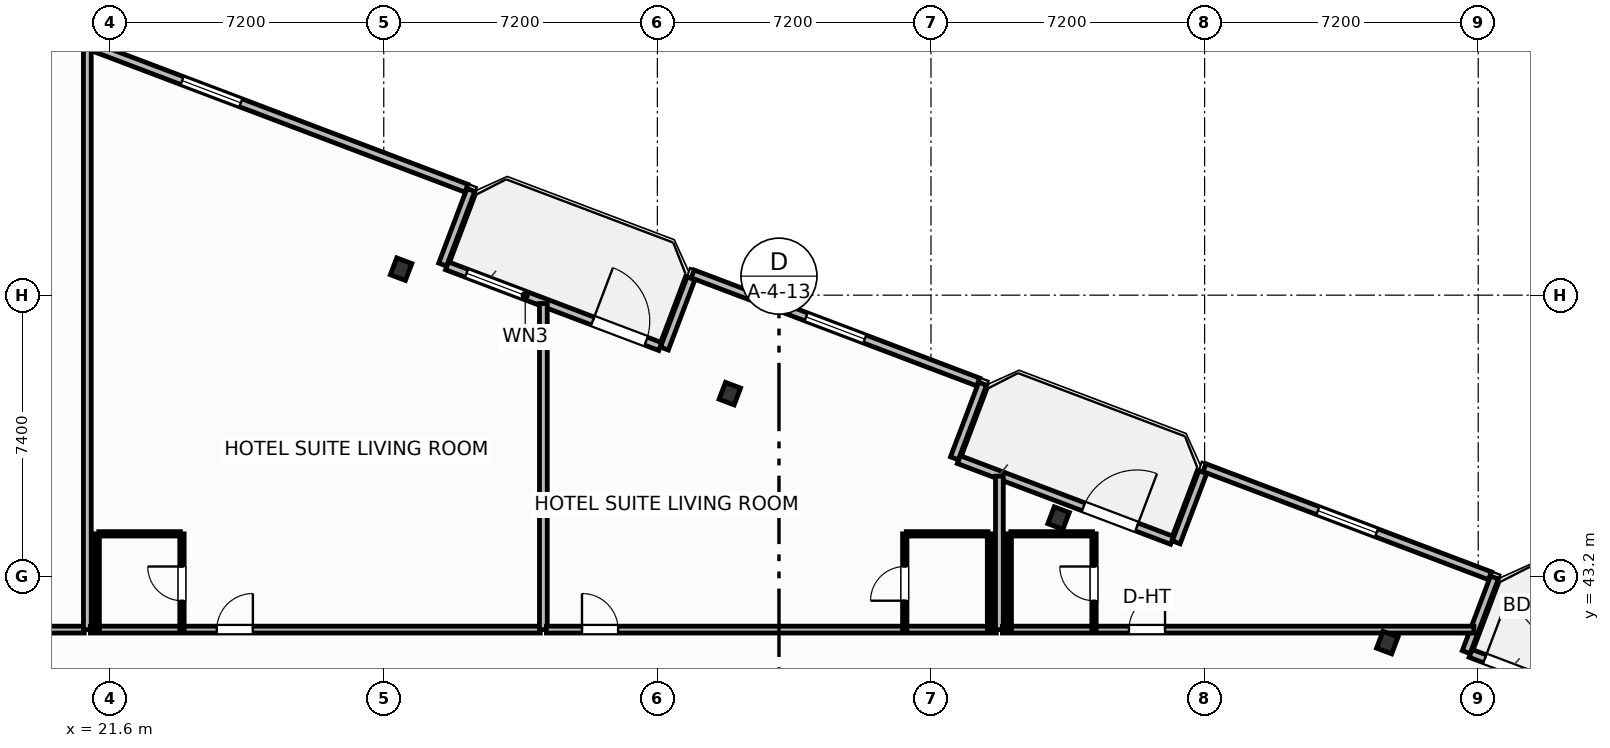
"""IFC4 building model, lengths in metres.
Left out: names, types, materials, properties, quantities, classifications, styles, units other than length and angle.
Written with IfcOpenShell. Run it as: python <this file> out.ifc"""

import sys

from ifc_helpers import new_model, si_unit, direction, frame, frame_2d, origin, origin_2d, place, context, subcontext, project, spatial, rectangle, i_section, extrude, element, fill, save


model = new_model("IFC4")
c1 = context("Model", 3, precision=1e-05, world=origin(), true_north=direction((0.0, 1.0)))
c2 = subcontext(c1, "Body", "Model", "MODEL_VIEW")
j1 = project(units=[si_unit("LENGTHUNIT", "METRE"), si_unit("PLANEANGLEUNIT", "RADIAN")], contexts=[c1])
p1 = place(None, origin())
s1 = spatial("IfcSite", under=j1, at=p1, CompositionType="ELEMENT")
p2 = place(p1, origin())
s2 = spatial("IfcBuilding", under=s1, at=p2, CompositionType="ELEMENT")
p3 = place(p2, frame((0.0, 0.0, 109.5)))
s3 = spatial("IfcBuildingStorey", under=s2, at=p3, CompositionType="ELEMENT", Elevation=109.5)
for number, where, z_axis, x_axis in (
    (1, (55.208, 41.459, 0.0), (0.0, 0.0, 1.0), (0.935, -0.354, 0.0)),
    (2, (46.557, 44.734, 0.0), (0.0, 0.0, 1.0), (0.935, -0.354, 0.0)),
    (3, (37.906, 48.009, 0.0), (0.0, 0.0, 1.0), (0.935, -0.354, 0.0)),
    (4, (29.256, 51.284, 0.0), (0.0, 0.0, 1.0), (0.935, -0.354, 0.0)),
):
    element("IfcColumn", number, at=place(p3, frame(where, z_axis=z_axis, x_axis=x_axis)), inside=s3, PredefinedType="COLUMN", context=c2, shape_type="SweptSolid", body=[
        extrude(i_section(OverallWidth=0.424, OverallDepth=0.474, WebThickness=0.048, FlangeThickness=0.077, FilletRadius=0.025, at=origin_2d()), origin(), (0.0, 0.0, 1.0), 3.7),
    ])
p4 = place(p3, frame((30.465, 51.372, 0.0), z_axis=(0.0, 0.0, 1.0), x_axis=(0.935227640088, -0.354046976001, 0.0)))
e5 = element("IfcWall", 5, at=p4, inside=s3, PredefinedType="SOLIDWALL", context=c2, shape_type="SweptSolid", body=[
    extrude(rectangle(XDim=6.0, YDim=0.22, at=frame_2d((3.0, 0.0))), origin(), (0.0, 0.0, 1.0), 2.73),
])
p5 = place(p4, frame((4.1, 0.0, 0.0)))
e6 = element("IfcOpeningElement", 6, at=p5, cuts=e5, PredefinedType="OPENING", context=c2, shape_type="SweptSolid", body=[
    extrude(rectangle(XDim=1.5, YDim=2.25, at=frame_2d((0.75, 1.125))), frame((0.0, 0.12, 0.0), z_axis=(0.0, -1.0, 0.0), x_axis=(1.0, 0.0, 0.0)), (0.0, 0.0, 1.0), 0.24),
])
p6 = place(p4, frame((0.55, 0.0, 0.75)))
e7 = element("IfcOpeningElement", 7, at=p6, cuts=e5, PredefinedType="OPENING", context=c2, shape_type="SweptSolid", body=[
    extrude(rectangle(XDim=1.65, YDim=1.65, at=frame_2d((0.825, 0.825))), frame((0.0, 0.12, 0.0), z_axis=(0.0, -1.0, 0.0), x_axis=(1.0, 0.0, 0.0)), (0.0, 0.0, 1.0), 0.24),
])
p7 = place(p3, frame((43.932, 46.273, 0.0), z_axis=(0.0, 0.0, 1.0), x_axis=(0.93521416643, -0.354082565101, 0.0)))
e8 = element("IfcWall", 8, at=p7, inside=s3, PredefinedType="SOLIDWALL", context=c2, shape_type="SweptSolid", body=[
    extrude(rectangle(XDim=6.0, YDim=0.22, at=frame_2d((3.0, 0.0))), origin(), (0.0, 0.0, 1.0), 2.73),
])
p8 = place(p7, frame((3.508, 0.0, 0.0)))
e9 = element("IfcOpeningElement", 9, at=p8, cuts=e8, PredefinedType="OPENING", context=c2, shape_type="SweptSolid", body=[
    extrude(rectangle(XDim=1.5, YDim=2.25, at=frame_2d((0.75, 1.125))), frame((0.0, 0.12, 0.0), z_axis=(0.0, -1.0, 0.0), x_axis=(1.0, 0.0, 0.0)), (0.0, 0.0, 1.0), 0.24),
])
p9 = place(p3, frame((57.399, 41.175, 0.0), z_axis=(0.0, 0.0, 1.0), x_axis=(0.935227640088, -0.354046976001, 0.0)))
e10 = element("IfcWall", 10, at=p9, inside=s3, PredefinedType="SOLIDWALL", context=c2, shape_type="SweptSolid", body=[
    extrude(rectangle(XDim=6.0, YDim=0.22, at=frame_2d((3.0, 0.0))), origin(), (0.0, 0.0, 1.0), 2.73),
])
p10 = place(p9, frame((0.4, 0.0, 0.0)))
e11 = element("IfcOpeningElement", 11, at=p10, cuts=e10, PredefinedType="OPENING", context=c2, shape_type="SweptSolid", body=[
    extrude(rectangle(XDim=1.5, YDim=2.25, at=frame_2d((0.75, 1.125))), frame((0.0, 0.12, 0.0), z_axis=(0.0, -1.0, 0.0), x_axis=(1.0, 0.0, 0.0)), (0.0, 0.0, 1.0), 0.24),
])
p11 = place(p3, frame((57.284, 41.208, 0.0), z_axis=(0.0, 0.0, 1.0), x_axis=(0.354128469405, 0.935196785258, 0.0)))
e12 = element("IfcWall", 12, at=p11, inside=s3, PredefinedType="SOLIDWALL", context=c2, shape_type="SweptSolid", body=[
    extrude(rectangle(XDim=2.1, YDim=0.22, at=frame_2d((1.05, 0.0))), origin(), (0.0, 0.0, 1.0), 2.73),
])
p12 = place(p3, frame((57.91, 43.216, 0.0), z_axis=(0.0, 0.0, 1.0), x_axis=(-0.935220736163, 0.354065212427, 0.0)))
e13 = element("IfcWall", 13, at=p12, inside=s3, PredefinedType="SOLIDWALL", context=c2, shape_type="SweptSolid", body=[
    extrude(rectangle(XDim=8.035, YDim=0.22, at=frame_2d((4.018, 0.0))), origin(), (0.0, 0.0, 1.0), 2.73),
])
p13 = place(p12, frame((3.192, 0.0, 0.8)))
e14 = element("IfcOpeningElement", 14, at=p13, cuts=e13, PredefinedType="OPENING", context=c2, shape_type="SweptSolid", body=[
    extrude(rectangle(XDim=1.65, YDim=1.65, at=frame_2d((0.825, 0.825))), frame((0.0, 0.12, 0.0), z_axis=(0.0, -1.0, 0.0), x_axis=(1.0, 0.0, 0.0)), (0.0, 0.0, 1.0), 0.24),
])
p14 = place(p3, frame((50.352, 45.944, 0.0), z_axis=(0.0, 0.0, 1.0), x_axis=(-0.354061611705, -0.935222099352, 0.0)))
e15 = element("IfcWall", 15, at=p14, inside=s3, PredefinedType="SOLIDWALL", context=c2, shape_type="SweptSolid", body=[
    extrude(rectangle(XDim=1.975, YDim=0.22, at=frame_2d((0.987, 0.0))), origin(), (0.0, 0.0, 1.0), 2.73),
])
p15 = place(p3, frame((43.817, 46.306, 0.0), z_axis=(0.0, 0.0, 1.0), x_axis=(0.353988291547, 0.935249854022, 0.0)))
e16 = element("IfcWall", 16, at=p15, inside=s3, PredefinedType="SOLIDWALL", context=c2, shape_type="SweptSolid", body=[
    extrude(rectangle(XDim=2.1, YDim=0.22, at=frame_2d((1.05, 0.0))), origin(), (0.0, 0.0, 1.0), 2.73),
])
p16 = place(p3, frame((44.443, 48.314, 0.0), z_axis=(0.0, 0.0, 1.0), x_axis=(-0.935226988293, 0.354048697735, 0.0)))
e17 = element("IfcWall", 17, at=p16, inside=s3, PredefinedType="SOLIDWALL", context=c2, shape_type="SweptSolid", body=[
    extrude(rectangle(XDim=8.035, YDim=0.22, at=frame_2d((4.018, 0.0))), origin(), (0.0, 0.0, 1.0), 2.73),
])
p17 = place(p16, frame((3.192, 0.0, 0.8)))
e18 = element("IfcOpeningElement", 18, at=p17, cuts=e17, PredefinedType="OPENING", context=c2, shape_type="SweptSolid", body=[
    extrude(rectangle(XDim=1.65, YDim=1.65, at=frame_2d((0.825, 0.825))), frame((0.0, 0.12, 0.0), z_axis=(0.0, -1.0, 0.0), x_axis=(1.0, 0.0, 0.0)), (0.0, 0.0, 1.0), 0.24),
])
p18 = place(p3, frame((36.885, 51.042, 0.0), z_axis=(0.0, 0.0, 1.0), x_axis=(-0.354128791944, -0.935196663123, 0.0)))
e19 = element("IfcWall", 19, at=p18, inside=s3, PredefinedType="SOLIDWALL", context=c2, shape_type="SweptSolid", body=[
    extrude(rectangle(XDim=1.975, YDim=0.22, at=frame_2d((0.988, 0.0))), origin(), (0.0, 0.0, 1.0), 2.73),
])
p19 = place(p3, frame((30.349, 51.405, 0.0), z_axis=(0.0, 0.0, 1.0), x_axis=(0.354128469405, 0.935196785258, 0.0)))
e20 = element("IfcWall", 20, at=p19, inside=s3, PredefinedType="SOLIDWALL", context=c2, shape_type="SweptSolid", body=[
    extrude(rectangle(XDim=2.1, YDim=0.22, at=frame_2d((1.05, 0.0))), origin(), (0.0, 0.0, 1.0), 2.73),
])
p20 = place(p3, frame((30.976, 53.413, 0.0), z_axis=(0.0, 0.0, 1.0), x_axis=(-0.935220327379, 0.354066292178, 0.0)))
e21 = element("IfcWall", 21, at=p20, inside=s3, PredefinedType="SOLIDWALL", context=c2, shape_type="SweptSolid", body=[
    extrude(rectangle(XDim=14.347, YDim=0.22, at=frame_2d((7.174, 0.0))), origin(), (0.0, 0.0, 1.0), 2.73),
])
p21 = place(p20, frame((6.348, 0.0, 0.8)))
e22 = element("IfcOpeningElement", 22, at=p21, cuts=e21, PredefinedType="OPENING", context=c2, shape_type="SweptSolid", body=[
    extrude(rectangle(XDim=1.65, YDim=1.65, at=frame_2d((0.825, 0.825))), frame((0.0, 0.12, 0.0), z_axis=(0.0, -1.0, 0.0), x_axis=(1.0, 0.0, 0.0)), (0.0, 0.0, 1.0), 0.24),
])
p22 = place(p3, frame((5.646, 41.8, 0.0), z_axis=(0.0, 0.0, 1.0), x_axis=(1.0, 0.0, 0.0)))
e23 = element("IfcWall", 23, at=p22, inside=s3, PredefinedType="PARTITIONING", context=c2, shape_type="SweptSolid", body=[
    extrude(rectangle(XDim=15.274, YDim=0.18, at=frame_2d((7.637, 0.0))), origin(), (0.0, 0.0, 1.0), 3.45),
])
p23 = place(p22, frame((13.329, 0.0, 0.0)))
e24 = element("IfcOpeningElement", 24, at=p23, cuts=e23, PredefinedType="OPENING", context=c2, shape_type="SweptSolid", body=[
    extrude(rectangle(XDim=0.95, YDim=2.05, at=frame_2d((0.475, 1.025))), frame((0.0, 0.1, 0.0), z_axis=(0.0, -1.0, 0.0), x_axis=(1.0, 0.0, 0.0)), (0.0, 0.0, 1.0), 0.2),
])
p24 = place(p3, frame((21.0, 41.8, 0.0), z_axis=(0.0, 0.0, 1.0), x_axis=(0.0, 1.0, 0.0)))
e25 = element("IfcWall", 25, at=p24, inside=s3, PredefinedType="PARTITIONING", context=c2, shape_type="SweptSolid", body=[
    extrude(rectangle(XDim=15.285, YDim=0.205, at=frame_2d((7.642, 0.0))), origin(), (0.0, 0.0, 1.0), 3.45),
])
p25 = place(p3, frame((21.08, 41.8, 0.0), z_axis=(0.0, 0.0, 1.0), x_axis=(1.0, 0.0, 0.0)))
e26 = element("IfcWall", 26, at=p25, inside=s3, PredefinedType="PARTITIONING", context=c2, shape_type="SweptSolid", body=[
    extrude(rectangle(XDim=11.84, YDim=0.18, at=frame_2d((5.92, 0.0))), origin(), (0.0, 0.0, 1.0), 3.45),
])
p26 = place(p25, frame((3.326, 0.0, 0.0)))
e27 = element("IfcOpeningElement", 27, at=p26, cuts=e26, PredefinedType="OPENING", context=c2, shape_type="SweptSolid", body=[
    extrude(rectangle(XDim=0.95, YDim=2.15, at=frame_2d((0.475, 1.075))), frame((0.0, 0.1, 0.0), z_axis=(0.0, -1.0, 0.0), x_axis=(1.0, 0.0, 0.0)), (0.0, 0.0, 1.0), 0.2),
])
p27 = place(p3, frame((21.3, 44.32, 0.0), z_axis=(0.0, 0.0, 1.0), x_axis=(1.0, 0.0, 0.0)))
e28 = element("IfcWall", 28, at=p27, inside=s3, PredefinedType="PARTITIONING", context=c2, shape_type="SweptSolid", body=[
    extrude(rectangle(XDim=2.15, YDim=0.115, at=frame_2d((1.075, 0.0))), origin(), (0.0, 0.0, 1.0), 2.972),
])
p28 = place(p3, frame((23.49, 41.8, 0.0), z_axis=(0.0, 0.0, 1.0), x_axis=(0.0, 1.0, 0.0)))
e29 = element("IfcWall", 29, at=p28, inside=s3, PredefinedType="PARTITIONING", context=c2, shape_type="SweptSolid", body=[
    extrude(rectangle(XDim=2.52, YDim=0.115, at=frame_2d((1.26, 0.0))), origin(), (0.0, 0.0, 1.0), 3.45),
])
p29 = place(p28, frame((0.76, 0.0, 0.0)))
e30 = element("IfcOpeningElement", 30, at=p29, cuts=e29, PredefinedType="OPENING", context=c2, shape_type="SweptSolid", body=[
    extrude(rectangle(XDim=0.9, YDim=2.05, at=frame_2d((0.45, 1.025))), frame((0.0, 0.067, 0.0), z_axis=(0.0, -1.0, 0.0), x_axis=(1.0, 0.0, 0.0)), (0.0, 0.0, 1.0), 0.135),
])
p30 = place(p3, frame((21.26, 41.8, 0.0), z_axis=(0.0, 0.0, 1.0), x_axis=(0.0, 1.0, 0.0)))
e31 = element("IfcWall", 31, at=p30, inside=s3, PredefinedType="PARTITIONING", context=c2, shape_type="SweptSolid", body=[
    extrude(rectangle(XDim=2.52, YDim=0.115, at=frame_2d((1.26, 0.0))), origin(), (0.0, 0.0, 1.0), 3.45),
])
p31 = place(p3, frame((33.0, 41.8, 0.0), z_axis=(0.0, 0.0, 1.0), x_axis=(0.0, 1.0, 0.0)))
e32 = element("IfcWall", 32, at=p31, inside=s3, PredefinedType="PARTITIONING", context=c2, shape_type="SweptSolid", body=[
    extrude(rectangle(XDim=8.58, YDim=0.205, at=frame_2d((4.29, 0.0))), origin(), (0.0, 0.0, 1.0), 3.45),
])
p32 = place(p3, frame((33.08, 41.8, 0.0), z_axis=(0.0, 0.0, 1.0), x_axis=(1.0, 0.0, 0.0)))
e33 = element("IfcWall", 33, at=p32, inside=s3, PredefinedType="PARTITIONING", context=c2, shape_type="SweptSolid", body=[
    extrude(rectangle(XDim=11.84, YDim=0.18, at=frame_2d((5.92, 0.0))), origin(), (0.0, 0.0, 1.0), 3.45),
])
p33 = place(p32, frame((0.936, 0.0, 0.0)))
e34 = element("IfcOpeningElement", 34, at=p33, cuts=e33, PredefinedType="OPENING", context=c2, shape_type="SweptSolid", body=[
    extrude(rectangle(XDim=0.95, YDim=2.15, at=frame_2d((0.475, 1.075))), frame((0.0, 0.1, 0.0), z_axis=(0.0, -1.0, 0.0), x_axis=(1.0, 0.0, 0.0)), (0.0, 0.0, 1.0), 0.2),
])
p34 = place(p3, frame((42.55, 44.32, 0.0), z_axis=(0.0, 0.0, 1.0), x_axis=(1.0, 0.0, 0.0)))
e35 = element("IfcWall", 35, at=p34, inside=s3, PredefinedType="PARTITIONING", context=c2, shape_type="SweptSolid", body=[
    extrude(rectangle(XDim=2.15, YDim=0.115, at=frame_2d((1.075, 0.0))), origin(), (0.0, 0.0, 1.0), 3.45),
])
p35 = place(p3, frame((42.51, 41.8, 0.0), z_axis=(0.0, 0.0, 1.0), x_axis=(0.0, 1.0, 0.0)))
e36 = element("IfcWall", 36, at=p35, inside=s3, PredefinedType="PARTITIONING", context=c2, shape_type="SweptSolid", body=[
    extrude(rectangle(XDim=2.52, YDim=0.115, at=frame_2d((1.26, 0.0))), origin(), (0.0, 0.0, 1.0), 3.45),
])
p36 = place(p35, frame((0.76, 0.0, 0.0)))
e37 = element("IfcOpeningElement", 37, at=p36, cuts=e36, PredefinedType="OPENING", context=c2, shape_type="SweptSolid", body=[
    extrude(rectangle(XDim=0.9, YDim=2.05, at=frame_2d((0.45, 1.025))), frame((0.0, 0.067, 0.0), z_axis=(0.0, -1.0, 0.0), x_axis=(1.0, 0.0, 0.0)), (0.0, 0.0, 1.0), 0.135),
])
p37 = place(p3, frame((44.74, 41.8, 0.0), z_axis=(0.0, 0.0, 1.0), x_axis=(0.0, 1.0, 0.0)))
e38 = element("IfcWall", 38, at=p37, inside=s3, PredefinedType="PARTITIONING", context=c2, shape_type="SweptSolid", body=[
    extrude(rectangle(XDim=2.52, YDim=0.115, at=frame_2d((1.26, 0.0))), origin(), (0.0, 0.0, 1.0), 3.45),
])
p38 = place(p3, frame((45.0, 41.8, 0.0), z_axis=(0.0, 0.0, 1.0), x_axis=(0.0, 1.0, 0.0)))
e39 = element("IfcWall", 39, at=p38, inside=s3, PredefinedType="PARTITIONING", context=c2, shape_type="SweptSolid", body=[
    extrude(rectangle(XDim=4.037, YDim=0.205, at=frame_2d((2.019, 0.0))), origin(), (0.0, 0.0, 1.0), 3.45),
])
p39 = place(p3, frame((45.08, 41.8, 0.0), z_axis=(0.0, 0.0, 1.0), x_axis=(1.0, 0.0, 0.0)))
e40 = element("IfcWall", 40, at=p39, inside=s3, PredefinedType="PARTITIONING", context=c2, shape_type="SweptSolid", body=[
    extrude(rectangle(XDim=12.406, YDim=0.18, at=frame_2d((6.203, 0.0))), origin(), (0.0, 0.0, 1.0), 3.45),
])
p40 = place(p39, frame((3.329, 0.0, 0.0)))
e41 = element("IfcOpeningElement", 41, at=p40, cuts=e40, PredefinedType="OPENING", context=c2, shape_type="SweptSolid", body=[
    extrude(rectangle(XDim=0.95, YDim=2.15, at=frame_2d((0.475, 1.075))), frame((0.0, 0.1, 0.0), z_axis=(0.0, -1.0, 0.0), x_axis=(1.0, 0.0, 0.0)), (0.0, 0.0, 1.0), 0.2),
])
p41 = place(p3, frame((45.3, 44.32, 0.0), z_axis=(0.0, 0.0, 1.0), x_axis=(1.0, 0.0, 0.0)))
e42 = element("IfcWall", 42, at=p41, inside=s3, PredefinedType="PARTITIONING", context=c2, shape_type="SweptSolid", body=[
    extrude(rectangle(XDim=2.15, YDim=0.115, at=frame_2d((1.075, 0.0))), origin(), (0.0, 0.0, 1.0), 3.45),
])
p42 = place(p3, frame((47.49, 41.8, 0.0), z_axis=(0.0, 0.0, 1.0), x_axis=(0.0, 1.0, 0.0)))
e43 = element("IfcWall", 43, at=p42, inside=s3, PredefinedType="PARTITIONING", context=c2, shape_type="SweptSolid", body=[
    extrude(rectangle(XDim=2.52, YDim=0.115, at=frame_2d((1.26, 0.0))), origin(), (0.0, 0.0, 1.0), 3.45),
])
p43 = place(p42, frame((0.76, 0.0, 0.0)))
e44 = element("IfcOpeningElement", 44, at=p43, cuts=e43, PredefinedType="OPENING", context=c2, shape_type="SweptSolid", body=[
    extrude(rectangle(XDim=0.9, YDim=2.05, at=frame_2d((0.45, 1.025))), frame((0.0, 0.067, 0.0), z_axis=(0.0, -1.0, 0.0), x_axis=(1.0, 0.0, 0.0)), (0.0, 0.0, 1.0), 0.135),
])
p44 = place(p3, frame((45.26, 41.8, 0.0), z_axis=(0.0, 0.0, 1.0), x_axis=(0.0, 1.0, 0.0)))
e45 = element("IfcWall", 45, at=p44, inside=s3, PredefinedType="PARTITIONING", context=c2, shape_type="SweptSolid", body=[
    extrude(rectangle(XDim=2.52, YDim=0.115, at=frame_2d((1.26, 0.0))), origin(), (0.0, 0.0, 1.0), 3.45),
])
p45 = place(p5, origin())
e46 = element("IfcDoor", 46, at=p45, inside=s3, OperationType="SINGLE_SWING_LEFT", PredefinedType="DOOR", context=c2, shape_type="SweptSolid", body=[
    extrude(rectangle(XDim=1.5, YDim=2.25, at=frame_2d((0.75, 1.125))), frame((0.0, 0.025, 0.0), z_axis=(0.0, -1.0, 0.0), x_axis=(1.0, 0.0, 0.0)), (0.0, 0.0, 1.0), 0.05),
])
fill(e6, e46)
p46 = place(p6, origin())
e47 = element("IfcWindow", 47, at=p46, inside=s3, PartitioningType="SINGLE_PANEL", PredefinedType="WINDOW", context=c2, shape_type="SweptSolid", body=[
    extrude(rectangle(XDim=1.65, YDim=1.65, at=frame_2d((0.825, 0.825))), frame((0.0, 0.03, 0.0), z_axis=(0.0, -1.0, 0.0), x_axis=(1.0, 0.0, 0.0)), (0.0, 0.0, 1.0), 0.06),
])
fill(e7, e47)
p47 = place(p8, origin())
e48 = element("IfcDoor", 48, at=p47, inside=s3, OperationType="SINGLE_SWING_RIGHT", PredefinedType="DOOR", context=c2, shape_type="SweptSolid", body=[
    extrude(rectangle(XDim=1.5, YDim=2.25, at=frame_2d((0.75, 1.125))), frame((0.0, 0.025, 0.0), z_axis=(0.0, -1.0, 0.0), x_axis=(1.0, 0.0, 0.0)), (0.0, 0.0, 1.0), 0.05),
])
fill(e9, e48)
p48 = place(p10, origin())
e49 = element("IfcDoor", 49, at=p48, inside=s3, OperationType="SINGLE_SWING_LEFT", PredefinedType="DOOR", context=c2, shape_type="SweptSolid", body=[
    extrude(rectangle(XDim=1.5, YDim=2.25, at=frame_2d((0.75, 1.125))), frame((0.0, 0.025, 0.0), z_axis=(0.0, -1.0, 0.0), x_axis=(1.0, 0.0, 0.0)), (0.0, 0.0, 1.0), 0.05),
])
fill(e11, e49)
p49 = place(p13, origin())
e50 = element("IfcWindow", 50, at=p49, inside=s3, PartitioningType="SINGLE_PANEL", PredefinedType="WINDOW", context=c2, shape_type="SweptSolid", body=[
    extrude(rectangle(XDim=1.65, YDim=1.65, at=frame_2d((0.825, 0.825))), frame((0.0, 0.03, 0.0), z_axis=(0.0, -1.0, 0.0), x_axis=(1.0, 0.0, 0.0)), (0.0, 0.0, 1.0), 0.06),
])
fill(e14, e50)
p50 = place(p17, origin())
e51 = element("IfcWindow", 51, at=p50, inside=s3, PartitioningType="SINGLE_PANEL", PredefinedType="WINDOW", context=c2, shape_type="SweptSolid", body=[
    extrude(rectangle(XDim=1.65, YDim=1.65, at=frame_2d((0.825, 0.825))), frame((0.0, 0.03, 0.0), z_axis=(0.0, -1.0, 0.0), x_axis=(1.0, 0.0, 0.0)), (0.0, 0.0, 1.0), 0.06),
])
fill(e18, e51)
p51 = place(p21, origin())
e52 = element("IfcWindow", 52, at=p51, inside=s3, PartitioningType="SINGLE_PANEL", PredefinedType="WINDOW", context=c2, shape_type="SweptSolid", body=[
    extrude(rectangle(XDim=1.65, YDim=1.65, at=frame_2d((0.825, 0.825))), frame((0.0, 0.03, 0.0), z_axis=(0.0, -1.0, 0.0), x_axis=(1.0, 0.0, 0.0)), (0.0, 0.0, 1.0), 0.06),
])
fill(e22, e52)
p52 = place(p26, origin())
e53 = element("IfcDoor", 53, at=p52, inside=s3, OperationType="SINGLE_SWING_RIGHT", PredefinedType="DOOR", context=c2, shape_type="SweptSolid", body=[
    extrude(rectangle(XDim=0.95, YDim=2.15, at=frame_2d((0.475, 1.075))), frame((0.0, 0.025, 0.0), z_axis=(0.0, -1.0, 0.0), x_axis=(1.0, 0.0, 0.0)), (0.0, 0.0, 1.0), 0.05),
])
fill(e27, e53)
p53 = place(p29, origin())
e54 = element("IfcDoor", 54, at=p53, inside=s3, OperationType="SINGLE_SWING_RIGHT", PredefinedType="DOOR", context=c2, shape_type="SweptSolid", body=[
    extrude(rectangle(XDim=0.9, YDim=2.05, at=frame_2d((0.45, 1.025))), frame((0.0, 0.025, 0.0), z_axis=(0.0, -1.0, 0.0), x_axis=(1.0, 0.0, 0.0)), (0.0, 0.0, 1.0), 0.05),
])
fill(e30, e54)
p54 = place(p33, origin())
e55 = element("IfcDoor", 55, at=p54, inside=s3, OperationType="SINGLE_SWING_LEFT", PredefinedType="DOOR", context=c2, shape_type="SweptSolid", body=[
    extrude(rectangle(XDim=0.95, YDim=2.15, at=frame_2d((0.475, 1.075))), frame((0.0, 0.025, 0.0), z_axis=(0.0, -1.0, 0.0), x_axis=(1.0, 0.0, 0.0)), (0.0, 0.0, 1.0), 0.05),
])
fill(e34, e55)
p55 = place(p36, origin())
e56 = element("IfcDoor", 56, at=p55, inside=s3, OperationType="SINGLE_SWING_LEFT", PredefinedType="DOOR", context=c2, shape_type="SweptSolid", body=[
    extrude(rectangle(XDim=0.9, YDim=2.05, at=frame_2d((0.45, 1.025))), frame((0.0, 0.025, 0.0), z_axis=(0.0, -1.0, 0.0), x_axis=(1.0, 0.0, 0.0)), (0.0, 0.0, 1.0), 0.05),
])
fill(e37, e56)
p56 = place(p40, origin())
e57 = element("IfcDoor", 57, at=p56, inside=s3, OperationType="SINGLE_SWING_RIGHT", PredefinedType="DOOR", context=c2, shape_type="SweptSolid", body=[
    extrude(rectangle(XDim=0.95, YDim=2.15, at=frame_2d((0.475, 1.075))), frame((0.0, 0.025, 0.0), z_axis=(0.0, -1.0, 0.0), x_axis=(1.0, 0.0, 0.0)), (0.0, 0.0, 1.0), 0.05),
])
fill(e41, e57)
p57 = place(p43, origin())
e58 = element("IfcDoor", 58, at=p57, inside=s3, OperationType="SINGLE_SWING_RIGHT", PredefinedType="DOOR", context=c2, shape_type="SweptSolid", body=[
    extrude(rectangle(XDim=0.9, YDim=2.05, at=frame_2d((0.45, 1.025))), frame((0.0, 0.025, 0.0), z_axis=(0.0, -1.0, 0.0), x_axis=(1.0, 0.0, 0.0)), (0.0, 0.0, 1.0), 0.05),
])
fill(e44, e58)
save(model, sys.argv[1])
